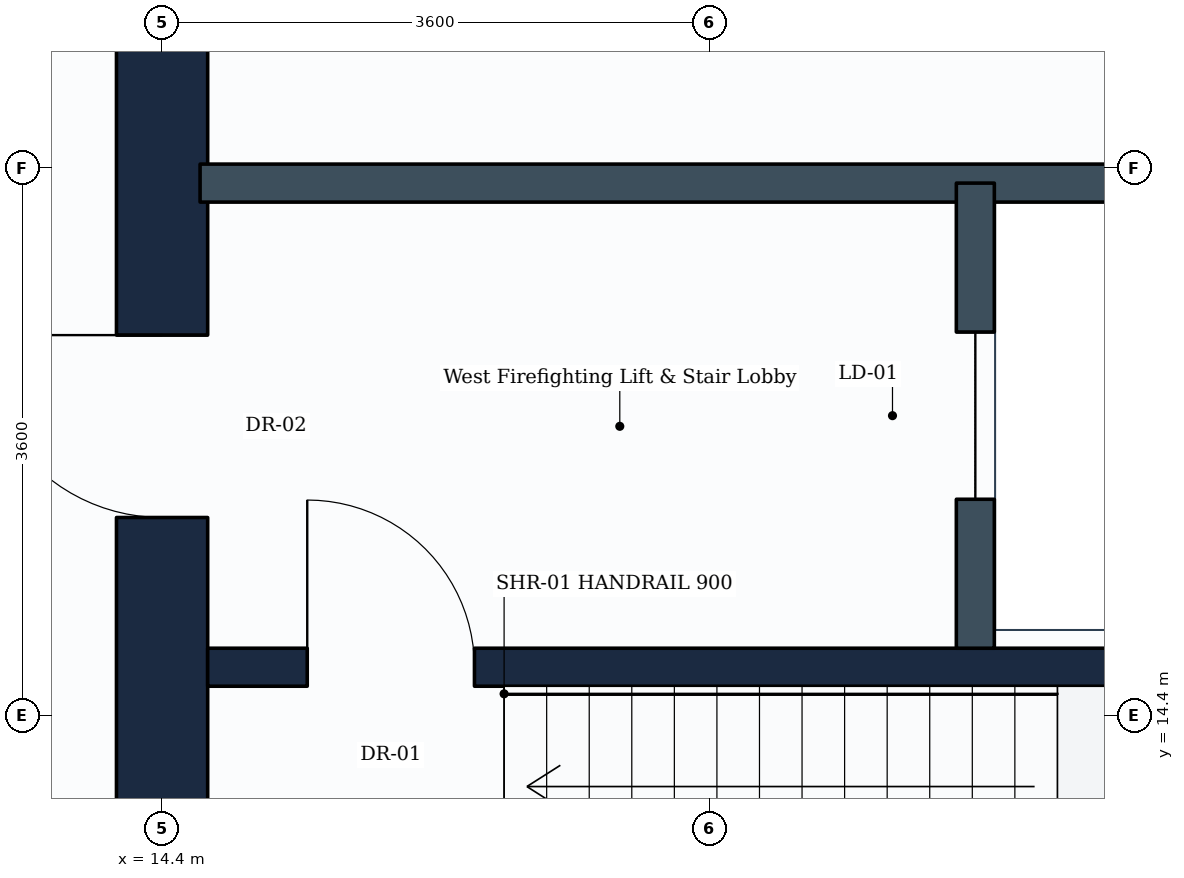
"""IFC4 building model, lengths in metres.
Left out: names, types, materials, properties, quantities, classifications, styles, units other than length and angle.
Written with IfcOpenShell. Run it as: python <this file> out.ifc"""

import sys

from ifc_helpers import new_model, si_unit, direction, frame, frame_2d, origin, place, context, subcontext, project, spatial, rectangle, extrude, element, fill, save


model = new_model("IFC4")
c1 = context("Model", 3, precision=1e-05, world=origin(), true_north=direction((0.0, 1.0)))
c2 = subcontext(c1, "Body", "Model", "MODEL_VIEW")
j1 = project(units=[si_unit("LENGTHUNIT", "METRE"), si_unit("PLANEANGLEUNIT", "RADIAN")], contexts=[c1])
p1 = place(None, origin())
s1 = spatial("IfcSite", under=j1, at=p1, CompositionType="ELEMENT")
p2 = place(p1, origin())
s2 = spatial("IfcBuilding", under=s1, at=p2, CompositionType="ELEMENT")
p3 = place(p2, frame((0.0, 0.0, -4.8)))
s3 = spatial("IfcBuildingStorey", under=s2, at=p3, CompositionType="ELEMENT", Elevation=-4.8)
p4 = place(p3, frame((14.4, 10.8, 0.0), z_axis=(0.0, 0.0, 1.0), x_axis=(0.0, 1.0, 0.0)))
e1 = element("IfcWall", 1, at=p4, inside=s3, PredefinedType="SHEAR", context=c2, shape_type="SweptSolid", body=[
    extrude(rectangle(XDim=14.4, YDim=0.6, at=frame_2d((7.2, 0.0))), origin(), (0.0, 0.0, 1.0), 4.45),
])
p5 = place(p4, frame((4.9, 0.0, 0.0)))
e2 = element("IfcOpeningElement", 2, at=p5, cuts=e1, PredefinedType="OPENING", context=c2, shape_type="SweptSolid", body=[
    extrude(rectangle(XDim=1.2, YDim=2.1, at=frame_2d((0.6, 1.05))), frame((0.0, 0.31, 0.0), z_axis=(0.0, -1.0, 0.0), x_axis=(1.0, 0.0, 0.0)), (0.0, 0.0, 1.0), 0.62),
])
p6 = place(p3, frame((14.7, 14.715, 0.0), z_axis=(0.0, 0.0, 1.0), x_axis=(1.0, 0.0, 0.0)))
e3 = element("IfcWall", 3, at=p6, inside=s3, PredefinedType="SHEAR", context=c2, shape_type="SweptSolid", body=[
    extrude(rectangle(XDim=8.65, YDim=0.25, at=frame_2d((4.325, 0.0))), origin(), (0.0, 0.0, 1.0), 4.45),
])
p7 = place(p6, frame((0.655, 0.0, 0.0)))
e4 = element("IfcOpeningElement", 4, at=p7, cuts=e3, PredefinedType="OPENING", context=c2, shape_type="SweptSolid", body=[
    extrude(rectangle(XDim=1.1, YDim=2.1, at=frame_2d((0.55, 1.05))), frame((0.0, 0.135, 0.0), z_axis=(0.0, -1.0, 0.0), x_axis=(1.0, 0.0, 0.0)), (0.0, 0.0, 1.0), 0.27),
])
p8 = place(p3, frame((14.65, 17.9, 0.0), z_axis=(0.0, 0.0, 1.0), x_axis=(1.0, 0.0, 0.0)))
e5 = element("IfcWall", 5, at=p8, inside=s3, PredefinedType="PARTITIONING", context=c2, shape_type="SweptSolid", body=[
    extrude(rectangle(XDim=7.15, YDim=0.25, at=frame_2d((3.575, 0.0))), origin(), (0.0, 0.0, 1.0), 4.435),
])
p9 = place(p3, frame((19.75, 14.84, 0.0), z_axis=(0.0, 0.0, 1.0), x_axis=(0.0, 1.0, 0.0)))
e6 = element("IfcWall", 6, at=p9, inside=s3, PredefinedType="PARTITIONING", context=c2, shape_type="SweptSolid", body=[
    extrude(rectangle(XDim=3.06, YDim=0.25, at=frame_2d((1.53, 0.0))), origin(), (0.0, 0.0, 1.0), 4.435),
])
p10 = place(p9, frame((0.98, 0.0, 0.0)))
e7 = element("IfcOpeningElement", 7, at=p10, cuts=e6, PredefinedType="OPENING", context=c2, shape_type="SweptSolid", body=[
    extrude(rectangle(XDim=1.1, YDim=2.1, at=frame_2d((0.55, 1.05))), frame((0.0, 0.135, 0.0), z_axis=(0.0, -1.0, 0.0), x_axis=(1.0, 0.0, 0.0)), (0.0, 0.0, 1.0), 0.27),
])
p11 = place(p7, origin())
e8 = element("IfcDoor", 8, at=p11, inside=s3, OperationType="SINGLE_SWING_LEFT", PredefinedType="DOOR", context=c2, shape_type="SweptSolid", body=[
    extrude(rectangle(XDim=1.1, YDim=2.1, at=frame_2d((0.55, 1.05))), frame((0.0, 0.025, 0.0), z_axis=(0.0, -1.0, 0.0), x_axis=(1.0, 0.0, 0.0)), (0.0, 0.0, 1.0), 0.05),
])
fill(e4, e8)
p12 = place(p10, origin())
e9 = element("IfcDoor", 9, at=p12, inside=s3, OperationType="SLIDING_TO_LEFT", PredefinedType="DOOR", context=c2, shape_type="SweptSolid", body=[
    extrude(rectangle(XDim=1.1, YDim=2.1, at=frame_2d((0.55, 1.05))), frame((0.0, 0.025, 0.0), z_axis=(0.0, -1.0, 0.0), x_axis=(1.0, 0.0, 0.0)), (0.0, 0.0, 1.0), 0.05),
])
fill(e7, e9)
p13 = place(p5, origin())
e10 = element("IfcDoor", 10, at=p13, inside=s3, OperationType="SINGLE_SWING_RIGHT", PredefinedType="DOOR", context=c2, shape_type="SweptSolid", body=[
    extrude(rectangle(XDim=1.2, YDim=2.1, at=frame_2d((0.6, 1.05))), frame((0.0, 0.025, 0.0), z_axis=(0.0, -1.0, 0.0), x_axis=(1.0, 0.0, 0.0)), (0.0, 0.0, 1.0), 0.05),
])
fill(e2, e10)
save(model, sys.argv[1])
